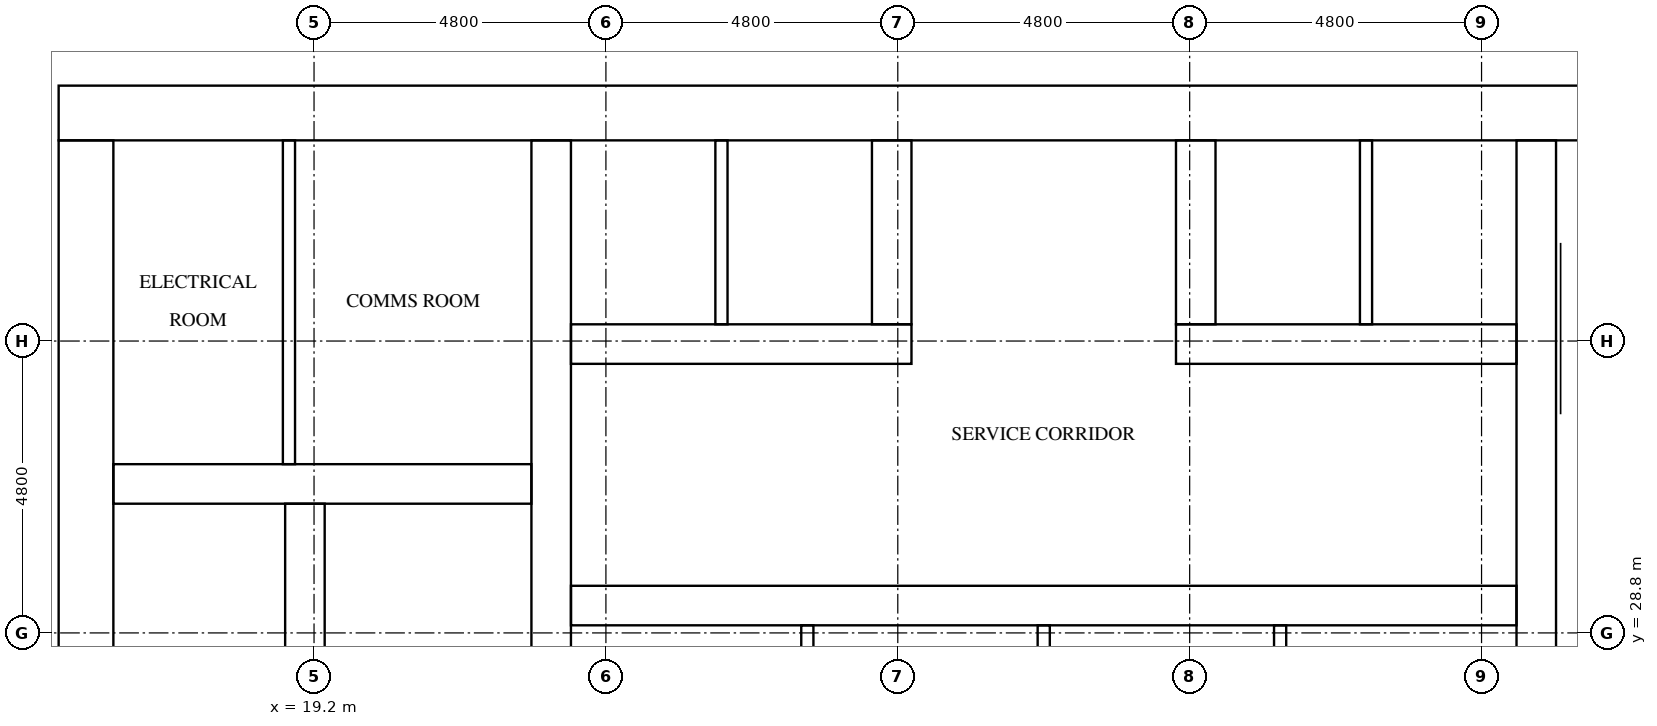
"""IFC4 building model, lengths in metres.
Left out: names, types, materials, properties, quantities, classifications, styles, units other than length and angle.
Written with IfcOpenShell. Run it as: python <this file> out.ifc"""

import sys

from ifc_helpers import new_model, si_unit, direction, frame, frame_2d, origin, place, context, subcontext, project, spatial, rectangle, extrude, element, fill, save


model = new_model("IFC4")
c1 = context("Model", 3, precision=1e-05, world=origin(), true_north=direction((0.0, 1.0)))
c2 = subcontext(c1, "Body", "Model", "MODEL_VIEW")
j1 = project(units=[si_unit("LENGTHUNIT", "METRE"), si_unit("PLANEANGLEUNIT", "RADIAN")], contexts=[c1])
p1 = place(None, origin())
s1 = spatial("IfcSite", under=j1, at=p1, CompositionType="ELEMENT")
p2 = place(p1, origin())
s2 = spatial("IfcBuilding", under=s1, at=p2, CompositionType="ELEMENT")
p3 = place(p2, frame((0.0, 0.0, 92.7)))
s3 = spatial("IfcBuildingStorey", under=s2, at=p3, CompositionType="ELEMENT", Elevation=92.7)
p4 = place(p3, frame((15.0, 37.35, 0.0), z_axis=(0.0, 0.0, 1.0), x_axis=(1.0, 0.0, 0.0)))
e1 = element("IfcWall", 1, at=p4, inside=s3, PredefinedType="SHEAR", context=c2, shape_type="SweptSolid", body=[
    extrude(rectangle(XDim=32.4, YDim=0.9, at=frame_2d((16.2, 0.0))), origin(), (0.0, 0.0, 1.0), 3.2),
])
p5 = place(p4, frame((15.3, 0.0, 0.0)))
e2 = element("IfcOpeningElement", 2, at=p5, cuts=e1, PredefinedType="OPENING", context=c2, shape_type="SweptSolid", body=[
    extrude(rectangle(XDim=1.8, YDim=2.1, at=frame_2d((0.9, 1.05))), frame((0.0, 0.46, 0.0), z_axis=(0.0, -1.0, 0.0), x_axis=(1.0, 0.0, 0.0)), (0.0, 0.0, 1.0), 0.92),
])
p6 = place(p4, frame((1.794, 0.0, 0.0)))
e3 = element("IfcOpeningElement", 3, at=p6, cuts=e1, PredefinedType="OPENING", context=c2, shape_type="SweptSolid", body=[
    extrude(rectangle(XDim=1.0, YDim=2.1, at=frame_2d((0.5, 1.05))), frame((0.0, 0.46, 0.0), z_axis=(0.0, -1.0, 0.0), x_axis=(1.0, 0.0, 0.0)), (0.0, 0.0, 1.0), 0.92),
])
p7 = place(p4, frame((5.331, 0.0, 0.0)))
e4 = element("IfcOpeningElement", 4, at=p7, cuts=e1, PredefinedType="OPENING", context=c2, shape_type="SweptSolid", body=[
    extrude(rectangle(XDim=1.0, YDim=2.1, at=frame_2d((0.5, 1.05))), frame((0.0, 0.46, 0.0), z_axis=(0.0, -1.0, 0.0), x_axis=(1.0, 0.0, 0.0)), (0.0, 0.0, 1.0), 0.92),
])
p8 = place(p3, frame((15.45, 15.9, 0.0), z_axis=(0.0, 0.0, 1.0), x_axis=(0.0, 1.0, 0.0)))
e5 = element("IfcWall", 5, at=p8, inside=s3, PredefinedType="SHEAR", context=c2, shape_type="SweptSolid", body=[
    extrude(rectangle(XDim=21.0, YDim=0.9, at=frame_2d((10.5, 0.0))), origin(), (0.0, 0.0, 1.0), 3.2),
])
p9 = place(p8, frame((4.86, 0.0, 0.0)))
e6 = element("IfcOpeningElement", 6, at=p9, cuts=e5, PredefinedType="OPENING", context=c2, shape_type="SweptSolid", body=[
    extrude(rectangle(XDim=1.2, YDim=2.1, at=frame_2d((0.6, 1.05))), frame((0.0, 0.46, 0.0), z_axis=(0.0, -1.0, 0.0), x_axis=(1.0, 0.0, 0.0)), (0.0, 0.0, 1.0), 0.92),
])
p10 = place(p3, frame((19.05, 15.9, 0.0), z_axis=(0.0, 0.0, 1.0), x_axis=(0.0, 1.0, 0.0)))
e7 = element("IfcWall", 7, at=p10, inside=s3, PredefinedType="SHEAR", context=c2, shape_type="SweptSolid", body=[
    extrude(rectangle(XDim=15.025, YDim=0.65, at=frame_2d((7.513, 0.0))), origin(), (0.0, 0.0, 1.0), 3.2),
])
p11 = place(p10, frame((9.55, 0.0, 0.0)))
e8 = element("IfcOpeningElement", 8, at=p11, cuts=e7, PredefinedType="OPENING", context=c2, shape_type="SweptSolid", body=[
    extrude(rectangle(XDim=1.1, YDim=2.1, at=frame_2d((0.55, 1.05))), frame((0.0, 0.335, 0.0), z_axis=(0.0, -1.0, 0.0), x_axis=(1.0, 0.0, 0.0)), (0.0, 0.0, 1.0), 0.67),
])
p12 = place(p10, frame((13.05, 0.0, 0.0)))
e9 = element("IfcOpeningElement", 9, at=p12, cuts=e7, PredefinedType="OPENING", context=c2, shape_type="SweptSolid", body=[
    extrude(rectangle(XDim=1.1, YDim=2.1, at=frame_2d((0.55, 1.05))), frame((0.0, 0.335, 0.0), z_axis=(0.0, -1.0, 0.0), x_axis=(1.0, 0.0, 0.0)), (0.0, 0.0, 1.0), 0.67),
])
p13 = place(p10, frame((0.3, 0.0, 0.0)))
e10 = element("IfcOpeningElement", 10, at=p13, cuts=e7, PredefinedType="OPENING", context=c2, shape_type="SweptSolid", body=[
    extrude(rectangle(XDim=1.2, YDim=2.1, at=frame_2d((0.6, 1.05))), frame((0.0, 0.335, 0.0), z_axis=(0.0, -1.0, 0.0), x_axis=(1.0, 0.0, 0.0)), (0.0, 0.0, 1.0), 0.67),
])
p14 = place(p3, frame((23.1, 15.9, 0.0), z_axis=(0.0, 0.0, 1.0), x_axis=(0.0, 1.0, 0.0)))
e11 = element("IfcWall", 11, at=p14, inside=s3, PredefinedType="SHEAR", context=c2, shape_type="SweptSolid", body=[
    extrude(rectangle(XDim=21.0, YDim=0.65, at=frame_2d((10.5, 0.0))), origin(), (0.0, 0.0, 1.0), 3.2),
])
p15 = place(p3, frame((39.3, 27.75, 0.0), z_axis=(0.0, 0.0, 1.0), x_axis=(0.0, 1.0, 0.0)))
e12 = element("IfcWall", 12, at=p15, inside=s3, PredefinedType="SHEAR", context=c2, shape_type="SweptSolid", body=[
    extrude(rectangle(XDim=9.15, YDim=0.65, at=frame_2d((4.575, 0.0))), origin(), (0.0, 0.0, 1.0), 3.2),
])
p16 = place(p3, frame((15.9, 31.25, 0.0), z_axis=(0.0, 0.0, 1.0), x_axis=(1.0, 0.0, 0.0)))
e13 = element("IfcWall", 13, at=p16, inside=s3, PredefinedType="SHEAR", context=c2, shape_type="SweptSolid", body=[
    extrude(rectangle(XDim=6.875, YDim=0.65, at=frame_2d((3.438, 0.0))), origin(), (0.0, 0.0, 1.0), 3.2),
])
p17 = place(p3, frame((23.425, 29.25, 0.0), z_axis=(0.0, 0.0, 1.0), x_axis=(1.0, 0.0, 0.0)))
e14 = element("IfcWall", 14, at=p17, inside=s3, PredefinedType="SHEAR", context=c2, shape_type="SweptSolid", body=[
    extrude(rectangle(XDim=15.55, YDim=0.65, at=frame_2d((7.775, 0.0))), origin(), (0.0, 0.0, 1.0), 3.2),
])
p18 = place(p17, frame((1.394, 0.0, 0.0)))
e15 = element("IfcOpeningElement", 15, at=p18, cuts=e14, PredefinedType="OPENING", context=c2, shape_type="SweptSolid", body=[
    extrude(rectangle(XDim=1.0, YDim=2.1, at=frame_2d((0.5, 1.05))), frame((0.0, 0.335, 0.0), z_axis=(0.0, -1.0, 0.0), x_axis=(1.0, 0.0, 0.0)), (0.0, 0.0, 1.0), 0.67),
])
p19 = place(p17, frame((5.331, 0.0, 0.0)))
e16 = element("IfcOpeningElement", 16, at=p19, cuts=e14, PredefinedType="OPENING", context=c2, shape_type="SweptSolid", body=[
    extrude(rectangle(XDim=1.0, YDim=2.1, at=frame_2d((0.5, 1.05))), frame((0.0, 0.335, 0.0), z_axis=(0.0, -1.0, 0.0), x_axis=(1.0, 0.0, 0.0)), (0.0, 0.0, 1.0), 0.67),
])
p20 = place(p17, frame((9.219, 0.0, 0.0)))
e17 = element("IfcOpeningElement", 17, at=p20, cuts=e14, PredefinedType="OPENING", context=c2, shape_type="SweptSolid", body=[
    extrude(rectangle(XDim=1.0, YDim=2.1, at=frame_2d((0.5, 1.05))), frame((0.0, 0.335, 0.0), z_axis=(0.0, -1.0, 0.0), x_axis=(1.0, 0.0, 0.0)), (0.0, 0.0, 1.0), 0.67),
])
p21 = place(p17, frame((13.156, 0.0, 0.0)))
e18 = element("IfcOpeningElement", 18, at=p21, cuts=e14, PredefinedType="OPENING", context=c2, shape_type="SweptSolid", body=[
    extrude(rectangle(XDim=1.0, YDim=2.1, at=frame_2d((0.5, 1.05))), frame((0.0, 0.335, 0.0), z_axis=(0.0, -1.0, 0.0), x_axis=(1.0, 0.0, 0.0)), (0.0, 0.0, 1.0), 0.67),
])
p22 = place(p3, frame((23.425, 33.55, 0.0), z_axis=(0.0, 0.0, 1.0), x_axis=(1.0, 0.0, 0.0)))
e19 = element("IfcWall", 19, at=p22, inside=s3, PredefinedType="SHEAR", context=c2, shape_type="SweptSolid", body=[
    extrude(rectangle(XDim=5.6, YDim=0.65, at=frame_2d((2.8, 0.0))), origin(), (0.0, 0.0, 1.0), 3.2),
])
p23 = place(p3, frame((33.375, 33.55, 0.0), z_axis=(0.0, 0.0, 1.0), x_axis=(1.0, 0.0, 0.0)))
e20 = element("IfcWall", 20, at=p23, inside=s3, PredefinedType="SHEAR", context=c2, shape_type="SweptSolid", body=[
    extrude(rectangle(XDim=5.6, YDim=0.65, at=frame_2d((2.8, 0.0))), origin(), (0.0, 0.0, 1.0), 3.2),
])
for number, where, z_axis, x_axis in (
    (21, (28.7, 33.875, 0.0), (0.0, 0.0, 1.0), (0.0, 1.0, 0.0)),
    (22, (33.7, 33.875, 0.0), (0.0, 0.0, 1.0), (0.0, 1.0, 0.0)),
):
    element("IfcWall", number, at=place(p3, frame(where, z_axis=z_axis, x_axis=x_axis)), inside=s3, PredefinedType="SHEAR", context=c2, shape_type="SweptSolid", body=[
        extrude(rectangle(XDim=3.025, YDim=0.65, at=frame_2d((1.512, 0.0))), origin(), (0.0, 0.0, 1.0), 3.2),
    ])
for number, where, z_axis, x_axis in (
    (23, (25.9, 33.875, 0.0), (0.0, 0.0, 1.0), (0.0, 1.0, 0.0)),
    (24, (36.5, 33.875, 0.0), (0.0, 0.0, 1.0), (0.0, 1.0, 0.0)),
):
    element("IfcWall", number, at=place(p3, frame(where, z_axis=z_axis, x_axis=x_axis)), inside=s3, PredefinedType="SOLIDWALL", context=c2, shape_type="SweptSolid", body=[
        extrude(rectangle(XDim=3.025, YDim=0.2, at=frame_2d((1.512, 0.0))), origin(), (0.0, 0.0, 1.0), 3.2),
    ])
p24 = place(p3, frame((18.788, 31.575, 0.0), z_axis=(0.0, 0.0, 1.0), x_axis=(0.0, 1.0, 0.0)))
e25 = element("IfcWall", 25, at=p24, inside=s3, PredefinedType="PARTITIONING", context=c2, shape_type="SweptSolid", body=[
    extrude(rectangle(XDim=5.325, YDim=0.2, at=frame_2d((2.663, 0.0))), origin(), (0.0, 0.0, 1.0), 3.2),
])
for number, where, z_axis, x_axis in (
    (26, (27.312, 26.475, 0.0), (0.0, 0.0, 1.0), (0.0, 1.0, 0.0)),
    (27, (31.2, 26.475, 0.0), (0.0, 0.0, 1.0), (0.0, 1.0, 0.0)),
    (28, (35.087, 26.475, 0.0), (0.0, 0.0, 1.0), (0.0, 1.0, 0.0)),
):
    element("IfcWall", number, at=place(p3, frame(where, z_axis=z_axis, x_axis=x_axis)), inside=s3, PredefinedType="PARTITIONING", context=c2, shape_type="SweptSolid", body=[
        extrude(rectangle(XDim=2.45, YDim=0.2, at=frame_2d((1.225, 0.0))), origin(), (0.0, 0.0, 1.0), 3.2),
    ])
p25 = place(p12, origin())
e29 = element("IfcDoor", 29, at=p25, inside=s3, OperationType="DOUBLE_DOOR_SLIDING", PredefinedType="DOOR", context=c2, shape_type="SweptSolid", body=[
    extrude(rectangle(XDim=1.1, YDim=2.1, at=frame_2d((0.55, 1.05))), frame((0.0, 0.025, 0.0), z_axis=(0.0, -1.0, 0.0), x_axis=(1.0, 0.0, 0.0)), (0.0, 0.0, 1.0), 0.05),
])
fill(e9, e29)
p26 = place(p5, origin())
e30 = element("IfcDoor", 30, at=p26, inside=s3, OperationType="DOUBLE_DOOR_SINGLE_SWING", PredefinedType="DOOR", context=c2, shape_type="SweptSolid", body=[
    extrude(rectangle(XDim=1.8, YDim=2.1, at=frame_2d((0.9, 1.05))), frame((0.0, 0.025, 0.0), z_axis=(0.0, -1.0, 0.0), x_axis=(1.0, 0.0, 0.0)), (0.0, 0.0, 1.0), 0.05),
])
fill(e2, e30)
p27 = place(p6, origin())
e31 = element("IfcDoor", 31, at=p27, inside=s3, OperationType="SINGLE_SWING_RIGHT", PredefinedType="DOOR", context=c2, shape_type="SweptSolid", body=[
    extrude(rectangle(XDim=1.0, YDim=2.1, at=frame_2d((0.5, 1.05))), frame((0.0, 0.025, 0.0), z_axis=(0.0, -1.0, 0.0), x_axis=(1.0, 0.0, 0.0)), (0.0, 0.0, 1.0), 0.05),
])
fill(e3, e31)
p28 = place(p7, origin())
e32 = element("IfcDoor", 32, at=p28, inside=s3, OperationType="SINGLE_SWING_LEFT", PredefinedType="DOOR", context=c2, shape_type="SweptSolid", body=[
    extrude(rectangle(XDim=1.0, YDim=2.1, at=frame_2d((0.5, 1.05))), frame((0.0, 0.025, 0.0), z_axis=(0.0, -1.0, 0.0), x_axis=(1.0, 0.0, 0.0)), (0.0, 0.0, 1.0), 0.05),
])
fill(e4, e32)
p29 = place(p18, origin())
e33 = element("IfcDoor", 33, at=p29, inside=s3, OperationType="SINGLE_SWING_LEFT", PredefinedType="DOOR", context=c2, shape_type="SweptSolid", body=[
    extrude(rectangle(XDim=1.0, YDim=2.1, at=frame_2d((0.5, 1.05))), frame((0.0, 0.025, 0.0), z_axis=(0.0, -1.0, 0.0), x_axis=(1.0, 0.0, 0.0)), (0.0, 0.0, 1.0), 0.05),
])
fill(e15, e33)
p30 = place(p19, origin())
e34 = element("IfcDoor", 34, at=p30, inside=s3, OperationType="SINGLE_SWING_RIGHT", PredefinedType="DOOR", context=c2, shape_type="SweptSolid", body=[
    extrude(rectangle(XDim=1.0, YDim=2.1, at=frame_2d((0.5, 1.05))), frame((0.0, 0.025, 0.0), z_axis=(0.0, -1.0, 0.0), x_axis=(1.0, 0.0, 0.0)), (0.0, 0.0, 1.0), 0.05),
])
fill(e16, e34)
p31 = place(p20, origin())
e35 = element("IfcDoor", 35, at=p31, inside=s3, OperationType="SINGLE_SWING_LEFT", PredefinedType="DOOR", context=c2, shape_type="SweptSolid", body=[
    extrude(rectangle(XDim=1.0, YDim=2.1, at=frame_2d((0.5, 1.05))), frame((0.0, 0.025, 0.0), z_axis=(0.0, -1.0, 0.0), x_axis=(1.0, 0.0, 0.0)), (0.0, 0.0, 1.0), 0.05),
])
fill(e17, e35)
p32 = place(p21, origin())
e36 = element("IfcDoor", 36, at=p32, inside=s3, OperationType="SINGLE_SWING_RIGHT", PredefinedType="DOOR", context=c2, shape_type="SweptSolid", body=[
    extrude(rectangle(XDim=1.0, YDim=2.1, at=frame_2d((0.5, 1.05))), frame((0.0, 0.025, 0.0), z_axis=(0.0, -1.0, 0.0), x_axis=(1.0, 0.0, 0.0)), (0.0, 0.0, 1.0), 0.05),
])
fill(e18, e36)
save(model, sys.argv[1])
